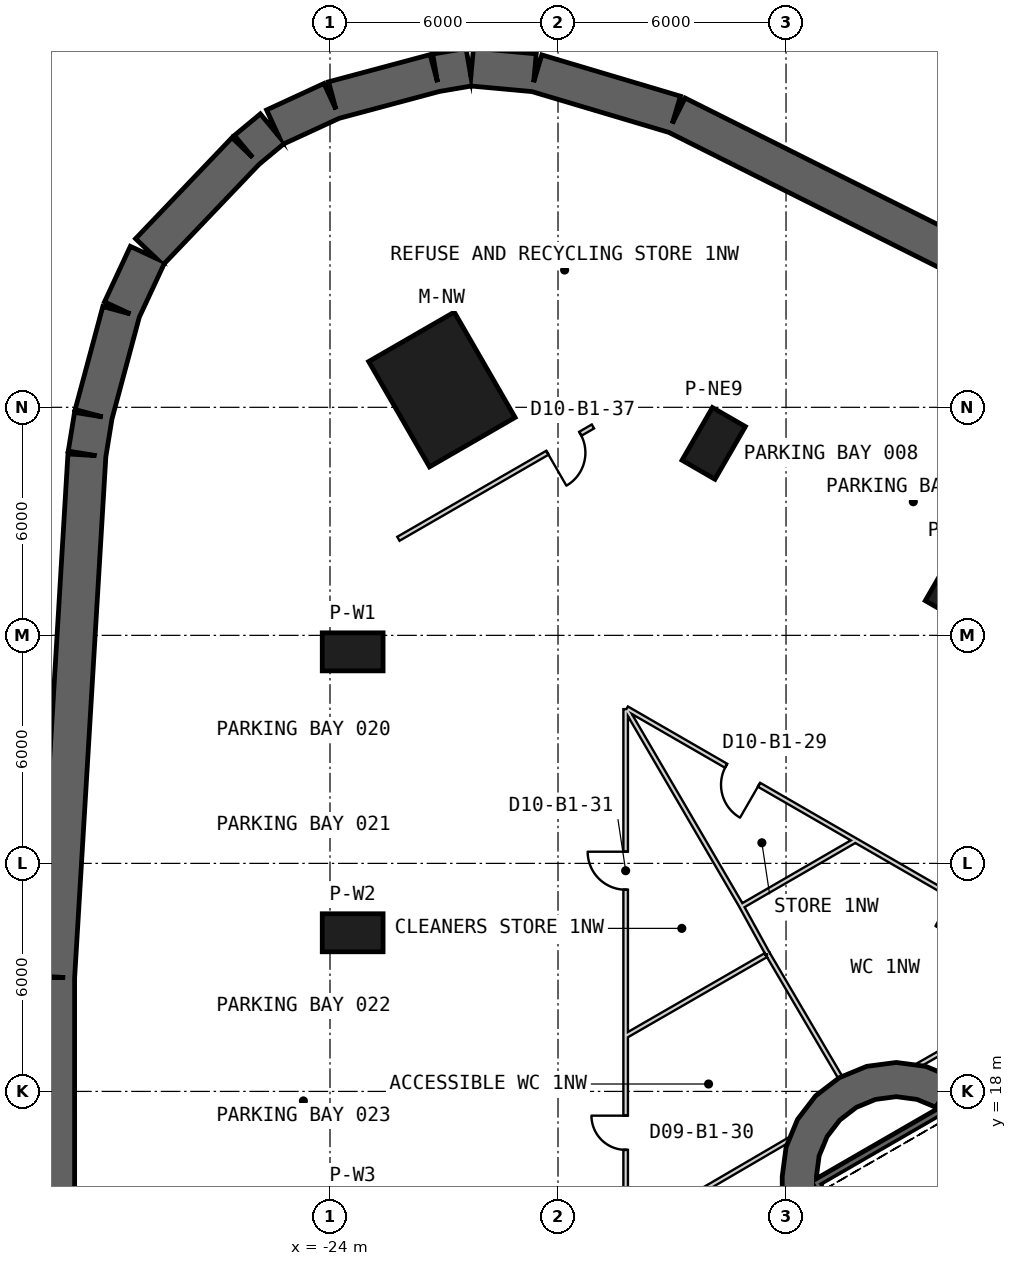
"""IFC4 building model, lengths in metres.
Left out: names, types, materials, properties, quantities, classifications, styles, units other than length and angle.
Written with IfcOpenShell. Run it as: python <this file> out.ifc"""

import sys

from ifc_helpers import new_model, si_unit, direction, frame, frame_2d, origin, origin_2d, place, context, subcontext, project, spatial, polyline, rectangle, outline, extrude, element, fill, save


model = new_model("IFC4")
c1 = context("Model", 3, precision=1e-05, world=origin(), true_north=direction((0.0, 1.0)))
c2 = subcontext(c1, "Body", "Model", "MODEL_VIEW")
j1 = project(units=[si_unit("LENGTHUNIT", "METRE"), si_unit("PLANEANGLEUNIT", "RADIAN")], contexts=[c1])
p1 = place(None, origin())
s1 = spatial("IfcSite", under=j1, at=p1, CompositionType="ELEMENT")
p2 = place(p1, origin())
s2 = spatial("IfcBuilding", under=s1, at=p2, CompositionType="ELEMENT")
p3 = place(p2, frame((0.0, 0.0, -5.5)))
s3 = spatial("IfcBuildingStorey", under=s2, at=p3, CompositionType="ELEMENT", Elevation=-5.5)
p4 = place(p3, frame((-31.217, -20.994, 0.0), z_axis=(0.0, 0.0, 1.0), x_axis=(-6.3957579e-05, 0.999999997955, 0.0)))
e1 = element("IfcWall", 1, at=p4, inside=s3, PredefinedType="SHEAR", context=c2, shape_type="SweptSolid", body=[
    extrude(rectangle(XDim=41.99, YDim=1.0, at=frame_2d((20.995, 0.0))), origin(), (0.0, 0.0, 1.0), 5.5),
])
p5 = place(p4, frame((21.094, 0.0, 0.0)))
e2 = element("IfcOpeningElement", 2, at=p5, cuts=e1, PredefinedType="OPENING", context=c2, shape_type="SweptSolid", body=[
    extrude(rectangle(XDim=3.4, YDim=3.4, at=frame_2d((1.7, 1.7))), frame((0.0, 0.51, 0.0), z_axis=(0.0, -1.0, 0.0), x_axis=(1.0, 0.0, 0.0)), (0.0, 0.0, 1.0), 1.02),
])
p6 = place(p4, frame((17.494, 0.0, 0.0)))
e3 = element("IfcOpeningElement", 3, at=p6, cuts=e1, PredefinedType="OPENING", context=c2, shape_type="SweptSolid", body=[
    extrude(rectangle(XDim=3.4, YDim=3.4, at=frame_2d((1.7, 1.7))), frame((0.0, 0.51, 0.0), z_axis=(0.0, -1.0, 0.0), x_axis=(1.0, 0.0, 0.0)), (0.0, 0.0, 1.0), 1.02),
])
p7 = place(p3, frame((-31.219, 21.01, 0.0), z_axis=(0.0, 0.0, 1.0), x_axis=(0.059807057285, 0.99820995582, 0.0)))
e4 = element("IfcWall", 4, at=p7, inside=s3, PredefinedType="SHEAR", context=c2, shape_type="SweptSolid", body=[
    extrude(rectangle(XDim=13.757, YDim=1.0, at=frame_2d((6.878, 0.0))), origin(), (0.0, 0.0, 1.0), 5.5),
])
p8 = place(p3, frame((-30.394, 34.768, 0.0), z_axis=(0.0, 0.0, 1.0), x_axis=(0.160027584178, 0.987112542876, 0.0)))
e5 = element("IfcWall", 5, at=p8, inside=s3, PredefinedType="SHEAR", context=c2, shape_type="SweptSolid", body=[
    extrude(rectangle(XDim=1.033, YDim=1.0, at=frame_2d((0.517, 0.0))), origin(), (0.0, 0.0, 1.0), 5.5),
])
p9 = place(p3, frame((-30.223, 35.812, 0.0), z_axis=(0.0, 0.0, 1.0), x_axis=(0.259383858959, 0.965774307854, 0.0)))
e6 = element("IfcWall", 6, at=p9, inside=s3, PredefinedType="SHEAR", context=c2, shape_type="SweptSolid", body=[
    extrude(rectangle(XDim=2.807, YDim=1.0, at=frame_2d((1.403, 0.0))), origin(), (0.0, 0.0, 1.0), 5.5),
])
p10 = place(p3, frame((-29.48, 38.563, 0.0), z_axis=(0.0, 0.0, 1.0), x_axis=(0.421832105884, 0.906673962594, 0.0)))
e7 = element("IfcWall", 7, at=p10, inside=s3, PredefinedType="SHEAR", context=c2, shape_type="SweptSolid", body=[
    extrude(rectangle(XDim=1.612, YDim=1.0, at=frame_2d((0.806, 0.0))), origin(), (0.0, 0.0, 1.0), 5.5),
])
p11 = place(p3, frame((-28.754, 40.092, 0.0), z_axis=(0.0, 0.0, 1.0), x_axis=(0.69046784388, 0.723363087645, 0.0)))
e8 = element("IfcWall", 8, at=p11, inside=s3, PredefinedType="SHEAR", context=c2, shape_type="SweptSolid", body=[
    extrude(rectangle(XDim=3.674, YDim=1.0, at=frame_2d((1.837, 0.0))), origin(), (0.0, 0.0, 1.0), 5.5),
])
p12 = place(p3, frame((-26.196, 42.769, 0.0), z_axis=(0.0, 0.0, 1.0), x_axis=(0.769573205415, 0.638558596768, 0.0)))
e9 = element("IfcWall", 9, at=p12, inside=s3, PredefinedType="SHEAR", context=c2, shape_type="SweptSolid", body=[
    extrude(rectangle(XDim=0.887, YDim=1.0, at=frame_2d((0.443, 0.0))), origin(), (0.0, 0.0, 1.0), 5.5),
])
p13 = place(p3, frame((-25.459, 43.37, 0.0), z_axis=(0.0, 0.0, 1.0), x_axis=(0.908019521695, 0.418927855628, 0.0)))
e10 = element("IfcWall", 10, at=p13, inside=s3, PredefinedType="SHEAR", context=c2, shape_type="SweptSolid", body=[
    extrude(rectangle(XDim=1.663, YDim=1.0, at=frame_2d((0.832, 0.0))), origin(), (0.0, 0.0, 1.0), 5.5),
])
p14 = place(p3, frame((-23.908, 44.081, 0.0), z_axis=(0.0, 0.0, 1.0), x_axis=(0.965914968132, 0.258859564898, 0.0)))
e11 = element("IfcWall", 11, at=p14, inside=s3, PredefinedType="SHEAR", context=c2, shape_type="SweptSolid", body=[
    extrude(rectangle(XDim=2.767, YDim=1.0, at=frame_2d((1.384, 0.0))), origin(), (0.0, 0.0, 1.0), 5.5),
])
p15 = place(p3, frame((-21.213, 44.802, 0.0), z_axis=(0.0, 0.0, 1.0), x_axis=(0.985764157253, 0.168133953366, 0.0)))
e12 = element("IfcWall", 12, at=p15, inside=s3, PredefinedType="SHEAR", context=c2, shape_type="SweptSolid", body=[
    extrude(rectangle(XDim=0.89, YDim=1.0, at=frame_2d((0.445, 0.0))), origin(), (0.0, 0.0, 1.0), 5.5),
])
p16 = place(p3, frame((-20.271, 44.955, 0.0), z_axis=(0.0, 0.0, 1.0), x_axis=(0.995846049361, -0.091052984425, 0.0)))
e13 = element("IfcWall", 13, at=p16, inside=s3, PredefinedType="SHEAR", context=c2, shape_type="SweptSolid", body=[
    extrude(rectangle(XDim=1.66, YDim=1.0, at=frame_2d((0.83, 0.0))), origin(), (0.0, 0.0, 1.0), 5.5),
])
p17 = place(p3, frame((-18.569, 44.794, 0.0), z_axis=(0.0, 0.0, 1.0), x_axis=(0.958375229974, -0.285511678523, 0.0)))
e14 = element("IfcWall", 14, at=p17, inside=s3, PredefinedType="SHEAR", context=c2, shape_type="SweptSolid", body=[
    extrude(rectangle(XDim=3.807, YDim=1.0, at=frame_2d((1.903, 0.0))), origin(), (0.0, 0.0, 1.0), 5.5),
])
p18 = place(p3, frame((-14.881, 43.691, 0.0), z_axis=(0.0, 0.0, 1.0), x_axis=(0.894257014389, -0.447553786954, 0.0)))
e15 = element("IfcWall", 15, at=p18, inside=s3, PredefinedType="SHEAR", context=c2, shape_type="SweptSolid", body=[
    extrude(rectangle(XDim=13.778, YDim=1.0, at=frame_2d((6.889, 0.0))), origin(), (0.0, 0.0, 1.0), 5.5),
])
p19 = place(p3, frame((-21.056, 36.469, 0.0), z_axis=(0.0, 0.0, 1.0), x_axis=(-0.5, 0.866025403784, 0.0)))
e16 = element("IfcColumn", 16, at=p19, inside=s3, PredefinedType="COLUMN", context=c2, shape_type="SweptSolid", body=[
    extrude(rectangle(XDim=3.2, YDim=2.6, at=origin_2d()), origin(), (0.0, 0.0, 1.0), 5.5),
])
for number, where, z_axis, x_axis in (
    (17, (-23.403, 29.566, 0.0), (0.0, 0.0, 1.0), (-1.0, 0.0, 0.0)),
    (18, (-23.403, 22.174, 0.0), (0.0, 0.0, 1.0), (-1.0, 0.0, 0.0)),
    (19, (-7.502, 31.355, 0.0), (0.0, 0.0, 1.0), (0.5, 0.866, 0.0)),
    (20, (-13.903, 35.051, 0.0), (0.0, 0.0, 1.0), (0.5, 0.866, 0.0)),
):
    element("IfcColumn", number, at=place(p3, frame(where, z_axis=z_axis, x_axis=x_axis)), inside=s3, PredefinedType="COLUMN", context=c2, shape_type="SweptSolid", body=[
        extrude(rectangle(XDim=1.6, YDim=1.0, at=origin_2d()), origin(), (0.0, 0.0, 1.0), 5.5),
    ])
p20 = place(p3, frame((19.475, 2.208, 0.0), z_axis=(0.0, 0.0, 1.0), x_axis=(-0.866028369851, 0.499994862586, 0.0)))
e21 = element("IfcWall", 21, at=p20, inside=s3, PredefinedType="SHEAR", context=c2, shape_type="SweptSolid", body=[
    extrude(rectangle(XDim=31.523, YDim=0.9, at=frame_2d((15.762, 0.0))), origin(), (0.0, 0.0, 1.0), 5.5),
])
p21 = place(p20, frame((3.612, 0.0, 0.0)))
e22 = element("IfcOpeningElement", 22, at=p21, cuts=e21, PredefinedType="OPENING", context=c2, shape_type="SweptSolid", body=[
    extrude(rectangle(XDim=1.2, YDim=2.4, at=frame_2d((0.6, 1.2))), frame((0.0, 0.46, 0.0), z_axis=(0.0, -1.0, 0.0), x_axis=(1.0, 0.0, 0.0)), (0.0, 0.0, 1.0), 0.92),
])
p22 = place(p20, frame((26.712, 0.0, 0.0)))
e23 = element("IfcOpeningElement", 23, at=p22, cuts=e21, PredefinedType="OPENING", context=c2, shape_type="SweptSolid", body=[
    extrude(rectangle(XDim=1.2, YDim=2.4, at=frame_2d((0.6, 1.2))), frame((0.0, 0.46, 0.0), z_axis=(0.0, -1.0, 0.0), x_axis=(1.0, 0.0, 0.0)), (0.0, 0.0, 1.0), 0.92),
])
p23 = place(p3, frame((-11.65, 15.762, 0.0), z_axis=(0.0, 0.0, 1.0), x_axis=(0.0, -1.0, 0.0)))
e24 = element("IfcWall", 24, at=p23, inside=s3, PredefinedType="SHEAR", context=c2, shape_type="SweptSolid", body=[
    extrude(rectangle(XDim=31.523, YDim=0.9, at=frame_2d((15.762, 0.0))), origin(), (0.0, 0.0, 1.0), 5.5),
])
p24 = place(p23, frame((3.612, 0.0, 0.0)))
e25 = element("IfcOpeningElement", 25, at=p24, cuts=e24, PredefinedType="OPENING", context=c2, shape_type="SweptSolid", body=[
    extrude(rectangle(XDim=1.2, YDim=2.4, at=frame_2d((0.6, 1.2))), frame((0.0, 0.46, 0.0), z_axis=(0.0, -1.0, 0.0), x_axis=(1.0, 0.0, 0.0)), (0.0, 0.0, 1.0), 0.92),
])
p25 = place(p23, frame((26.712, 0.0, 0.0)))
e26 = element("IfcOpeningElement", 26, at=p25, cuts=e24, PredefinedType="OPENING", context=c2, shape_type="SweptSolid", body=[
    extrude(rectangle(XDim=1.2, YDim=2.4, at=frame_2d((0.6, 1.2))), frame((0.0, 0.46, 0.0), z_axis=(0.0, -1.0, 0.0), x_axis=(1.0, 0.0, 0.0)), (0.0, 0.0, 1.0), 0.92),
])
p26 = place(p3, origin())
e27 = element("IfcWall", 27, at=p26, inside=s3, PredefinedType="SHEAR", context=c2, shape_type="SweptSolid", body=[
    extrude(outline(polyline([(-7.6, 18.36), (-8.323, 18.659), (-9.1, 18.762), (-9.876, 18.659), (-10.6, 18.36), (-11.221, 17.883), (-11.698, 17.262), (-11.998, 16.538), (-12.1, 15.762), (-11.2, 15.762), (-11.128, 16.305), (-10.919, 16.812), (-10.585, 17.247), (-10.15, 17.58), (-9.644, 17.79), (-9.1, 17.862), (-8.556, 17.79), (-8.05, 17.58), (-7.6, 18.36)])), origin(), (0.0, 0.0, 1.0), 5.5),
])
p27 = place(p3, frame((-11.245, 15.678, -0.4), z_axis=(0.0, 0.0, 1.0), x_axis=(0.499977274689, -0.866038523851, 0.0)))
e28 = element("IfcWall", 28, at=p27, inside=s3, PredefinedType="SHEAR", context=c2, shape_type="SweptSolid", body=[
    extrude(rectangle(XDim=8.1, YDim=0.2, at=frame_2d((4.05, 0.0))), origin(), (0.0, 0.0, 1.0), 5.5),
])
p28 = place(p3, frame((-7.818, 17.541, -0.4), z_axis=(0.0, 0.0, 1.0), x_axis=(-0.866044365799, -0.499967155389, 0.0)))
e29 = element("IfcWall", 29, at=p28, inside=s3, PredefinedType="SHEAR", context=c2, shape_type="SweptSolid", body=[
    extrude(rectangle(XDim=3.8, YDim=0.2, at=frame_2d((1.9, 0.0))), origin(), (0.0, 0.0, 1.0), 5.5),
])
p29 = place(p3, frame((32.38, 0.046, 0.0), z_axis=(0.0, 0.0, 1.0), x_axis=(-0.86611360534, 0.499847199298, 0.0)))
e30 = element("IfcWall", 30, at=p29, inside=s3, PredefinedType="PARTITIONING", context=c2, shape_type="SweptSolid", body=[
    extrude(rectangle(XDim=56.078, YDim=0.12, at=frame_2d((28.039, 0.0))), origin(), (0.0, 0.0, 1.0), 4.07),
])
p30 = place(p29, frame((30.481, 0.0, 0.0)))
e31 = element("IfcOpeningElement", 31, at=p30, cuts=e30, PredefinedType="OPENING", context=c2, shape_type="SweptSolid", body=[
    extrude(rectangle(XDim=1.2, YDim=2.4, at=frame_2d((0.6, 1.2))), frame((0.0, 0.07, 0.0), z_axis=(0.0, -1.0, 0.0), x_axis=(1.0, 0.0, 0.0)), (0.0, 0.0, 1.0), 0.14),
])
p31 = place(p29, frame((10.481, 0.0, 0.0)))
e32 = element("IfcOpeningElement", 32, at=p31, cuts=e30, PredefinedType="OPENING", context=c2, shape_type="SweptSolid", body=[
    extrude(rectangle(XDim=1.2, YDim=2.4, at=frame_2d((0.6, 1.2))), frame((0.0, 0.07, 0.0), z_axis=(0.0, -1.0, 0.0), x_axis=(1.0, 0.0, 0.0)), (0.0, 0.0, 1.0), 0.14),
])
p32 = place(p29, frame((45.282, 0.0, 0.0)))
e33 = element("IfcOpeningElement", 33, at=p32, cuts=e30, PredefinedType="OPENING", context=c2, shape_type="SweptSolid", body=[
    extrude(rectangle(XDim=0.9, YDim=2.1, at=frame_2d((0.45, 1.05))), frame((0.0, 0.07, 0.0), z_axis=(0.0, -1.0, 0.0), x_axis=(1.0, 0.0, 0.0)), (0.0, 0.0, 1.0), 0.14),
])
p33 = place(p29, frame((52.061, 0.0, 0.0)))
e34 = element("IfcOpeningElement", 34, at=p33, cuts=e30, PredefinedType="OPENING", context=c2, shape_type="SweptSolid", body=[
    extrude(rectangle(XDim=1.0, YDim=2.1, at=frame_2d((0.5, 1.05))), frame((0.0, 0.07, 0.0), z_axis=(0.0, -1.0, 0.0), x_axis=(1.0, 0.0, 0.0)), (0.0, 0.0, 1.0), 0.14),
])
p34 = place(p3, frame((-16.22, -20.053, 0.0), z_axis=(0.0, 0.0, 1.0), x_axis=(0.0, 1.0, 0.0)))
e35 = element("IfcWall", 35, at=p34, inside=s3, PredefinedType="PARTITIONING", context=c2, shape_type="SweptSolid", body=[
    extrude(rectangle(XDim=48.113, YDim=0.12, at=frame_2d((24.056, 0.0))), origin(), (0.0, 0.0, 1.0), 4.07),
])
p35 = place(p34, frame((12.991, 0.0, 0.0)))
e36 = element("IfcOpeningElement", 36, at=p35, cuts=e35, PredefinedType="OPENING", context=c2, shape_type="SweptSolid", body=[
    extrude(rectangle(XDim=1.2, YDim=2.4, at=frame_2d((0.6, 1.2))), frame((0.0, 0.07, 0.0), z_axis=(0.0, -1.0, 0.0), x_axis=(1.0, 0.0, 0.0)), (0.0, 0.0, 1.0), 0.14),
])
p36 = place(p34, frame((25.991, 0.0, 0.0)))
e37 = element("IfcOpeningElement", 37, at=p36, cuts=e35, PredefinedType="OPENING", context=c2, shape_type="SweptSolid", body=[
    extrude(rectangle(XDim=1.2, YDim=2.4, at=frame_2d((0.6, 1.2))), frame((0.0, 0.07, 0.0), z_axis=(0.0, -1.0, 0.0), x_axis=(1.0, 0.0, 0.0)), (0.0, 0.0, 1.0), 0.14),
])
p37 = place(p34, frame((36.515, 0.0, 0.0)))
e38 = element("IfcOpeningElement", 38, at=p37, cuts=e35, PredefinedType="OPENING", context=c2, shape_type="SweptSolid", body=[
    extrude(rectangle(XDim=0.9, YDim=2.1, at=frame_2d((0.45, 1.05))), frame((0.0, 0.07, 0.0), z_axis=(0.0, -1.0, 0.0), x_axis=(1.0, 0.0, 0.0)), (0.0, 0.0, 1.0), 0.14),
])
p38 = place(p34, frame((43.361, 0.0, 0.0)))
e39 = element("IfcOpeningElement", 39, at=p38, cuts=e35, PredefinedType="OPENING", context=c2, shape_type="SweptSolid", body=[
    extrude(rectangle(XDim=1.0, YDim=2.1, at=frame_2d((0.5, 1.05))), frame((0.0, 0.07, 0.0), z_axis=(0.0, -1.0, 0.0), x_axis=(1.0, 0.0, 0.0)), (0.0, 0.0, 1.0), 0.14),
])
p39 = place(p34, frame((2.394, 0.0, 0.0)))
e40 = element("IfcOpeningElement", 40, at=p39, cuts=e35, PredefinedType="OPENING", context=c2, shape_type="SweptSolid", body=[
    extrude(rectangle(XDim=1.0, YDim=2.1, at=frame_2d((0.5, 1.05))), frame((0.0, 0.07, 0.0), z_axis=(0.0, -1.0, 0.0), x_axis=(1.0, 0.0, 0.0)), (0.0, 0.0, 1.0), 0.14),
])
p40 = place(p3, frame((-17.081, 35.496, 0.0), z_axis=(0.0, 0.0, 1.0), x_axis=(-0.866020498397, -0.500008496284, 0.0)))
e41 = element("IfcWall", 41, at=p40, inside=s3, PredefinedType="PARTITIONING", context=c2, shape_type="SweptSolid", body=[
    extrude(rectangle(XDim=5.911, YDim=0.12, at=frame_2d((2.955, 0.0))), origin(), (0.0, 0.0, 1.0), 4.07),
])
p41 = place(p40, frame((0.383, 0.0, 0.0)))
e42 = element("IfcOpeningElement", 42, at=p41, cuts=e41, PredefinedType="OPENING", context=c2, shape_type="SweptSolid", body=[
    extrude(rectangle(XDim=1.0, YDim=2.1, at=frame_2d((0.5, 1.05))), frame((0.0, 0.07, 0.0), z_axis=(0.0, -1.0, 0.0), x_axis=(1.0, 0.0, 0.0)), (0.0, 0.0, 1.0), 0.14),
])
p42 = place(p3, frame((-4.22, 21.143, 0.0), z_axis=(0.0, 0.0, 1.0), x_axis=(-0.868530929613, -0.495634970825, 0.0)))
e43 = element("IfcWall", 43, at=p42, inside=s3, PredefinedType="PARTITIONING", context=c2, shape_type="SweptSolid", body=[
    extrude(rectangle(XDim=5.166, YDim=0.12, at=frame_2d((2.583, 0.0))), origin(), (0.0, 0.0, 1.0), 4.18),
])
p43 = place(p3, frame((-11.74, 16.832, 0.0), z_axis=(0.0, 0.0, 1.0), x_axis=(-0.863501067027, -0.504347010741, 0.0)))
e44 = element("IfcWall", 44, at=p43, inside=s3, PredefinedType="PARTITIONING", context=c2, shape_type="SweptSolid", body=[
    extrude(rectangle(XDim=5.166, YDim=0.12, at=frame_2d((2.583, 0.0))), origin(), (0.0, 0.0, 1.0), 4.18),
])
p44 = place(p3, frame((-10.197, 24.594, 0.0), z_axis=(0.0, 0.0, 1.0), x_axis=(-0.865437539194, -0.501016831807, 0.0)))
e45 = element("IfcWall", 45, at=p44, inside=s3, PredefinedType="PARTITIONING", context=c2, shape_type="SweptSolid", body=[
    extrude(rectangle(XDim=3.466, YDim=0.12, at=frame_2d((1.733, 0.0))), origin(), (0.0, 0.0, 1.0), 4.07),
])
p45 = place(p3, frame((-12.479, 21.615, 0.0), z_axis=(0.0, 0.0, 1.0), x_axis=(0.506545569598, -0.862213190528, 0.0)))
e46 = element("IfcWall", 46, at=p45, inside=s3, PredefinedType="PARTITIONING", context=c2, shape_type="SweptSolid", body=[
    extrude(rectangle(XDim=3.913, YDim=0.12, at=frame_2d((1.956, 0.0))), origin(), (0.0, 0.0, 1.0), 4.07),
])
p46 = place(p3, frame((-13.186, 22.898, 0.0), z_axis=(0.0, 0.0, 1.0), x_axis=(0.482129852101, -0.876099769269, 0.0)))
e47 = element("IfcWall", 47, at=p46, inside=s3, PredefinedType="PARTITIONING", context=c2, shape_type="SweptSolid", body=[
    extrude(rectangle(XDim=1.465, YDim=0.12, at=frame_2d((0.732, 0.0))), origin(), (0.0, 0.0, 1.0), 4.07),
])
p47 = place(p3, frame((-13.186, 22.898, 0.0), z_axis=(0.0, 0.0, 1.0), x_axis=(-0.504338258722, 0.863506178779, 0.0)))
e48 = element("IfcWall", 48, at=p47, inside=s3, PredefinedType="PARTITIONING", context=c2, shape_type="SweptSolid", body=[
    extrude(rectangle(XDim=5.977, YDim=0.12, at=frame_2d((2.989, 0.0))), origin(), (0.0, 0.0, 1.0), 4.07),
])
p48 = place(p3, frame((-12.531, 21.585, 0.0), z_axis=(0.0, 0.0, 1.0), x_axis=(-0.866495491634, -0.499184898588, 0.0)))
e49 = element("IfcWall", 49, at=p48, inside=s3, PredefinedType="PARTITIONING", context=c2, shape_type="SweptSolid", body=[
    extrude(rectangle(XDim=4.234, YDim=0.12, at=frame_2d((2.117, 0.0))), origin(), (0.0, 0.0, 1.0), 4.07),
])
p49 = place(p33, origin())
e50 = element("IfcDoor", 50, at=p49, inside=s3, OperationType="SINGLE_SWING_LEFT", PredefinedType="NOTDEFINED", context=c2, shape_type="SweptSolid", body=[
    extrude(rectangle(XDim=1.0, YDim=2.1, at=frame_2d((0.5, 1.05))), frame((0.0, 0.025, 0.0), z_axis=(0.0, -1.0, 0.0), x_axis=(1.0, 0.0, 0.0)), (0.0, 0.0, 1.0), 0.05),
])
fill(e34, e50)
p50 = place(p37, origin())
e51 = element("IfcDoor", 51, at=p50, inside=s3, OperationType="SINGLE_SWING_RIGHT", PredefinedType="NOTDEFINED", context=c2, shape_type="SweptSolid", body=[
    extrude(rectangle(XDim=0.9, YDim=2.1, at=frame_2d((0.45, 1.05))), frame((0.0, 0.025, 0.0), z_axis=(0.0, -1.0, 0.0), x_axis=(1.0, 0.0, 0.0)), (0.0, 0.0, 1.0), 0.05),
])
fill(e38, e51)
p51 = place(p38, origin())
e52 = element("IfcDoor", 52, at=p51, inside=s3, OperationType="SINGLE_SWING_RIGHT", PredefinedType="NOTDEFINED", context=c2, shape_type="SweptSolid", body=[
    extrude(rectangle(XDim=1.0, YDim=2.1, at=frame_2d((0.5, 1.05))), frame((0.0, 0.025, 0.0), z_axis=(0.0, -1.0, 0.0), x_axis=(1.0, 0.0, 0.0)), (0.0, 0.0, 1.0), 0.05),
])
fill(e39, e52)
p52 = place(p41, origin())
e53 = element("IfcDoor", 53, at=p52, inside=s3, OperationType="SINGLE_SWING_RIGHT", PredefinedType="NOTDEFINED", context=c2, shape_type="SweptSolid", body=[
    extrude(rectangle(XDim=1.0, YDim=2.1, at=frame_2d((0.5, 1.05))), frame((0.0, 0.025, 0.0), z_axis=(0.0, -1.0, 0.0), x_axis=(1.0, 0.0, 0.0)), (0.0, 0.0, 1.0), 0.05),
])
fill(e42, e53)
save(model, sys.argv[1])
